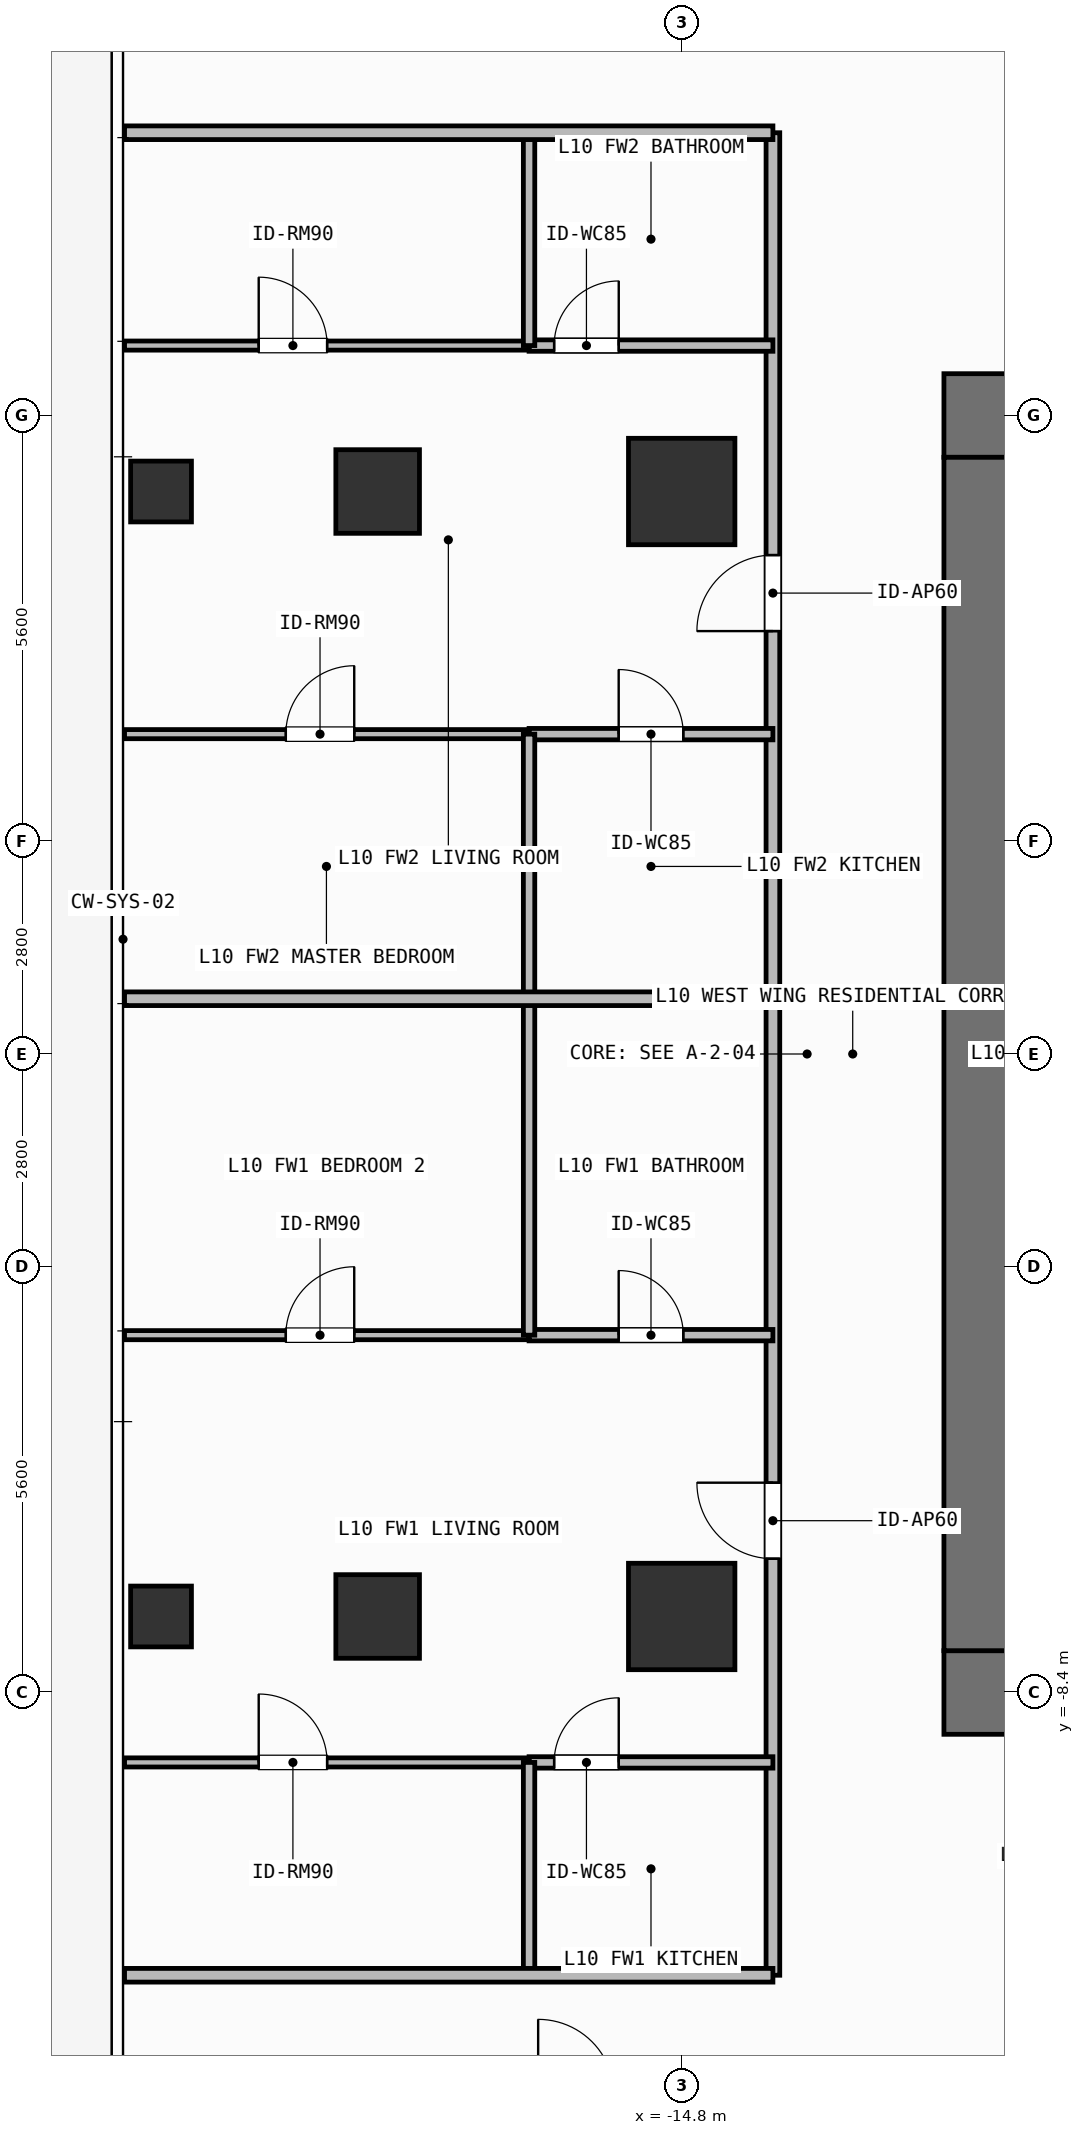
"""IFC4 building model, lengths in metres.
Left out: names, types, materials, properties, quantities, classifications, styles, units other than length and angle.
Written with IfcOpenShell. Run it as: python <this file> out.ifc"""

import sys

from ifc_helpers import new_model, si_unit, direction, frame, frame_2d, origin, origin_2d, place, context, subcontext, project, spatial, rectangle, hollow_rectangle, extrude, element, fill, save


model = new_model("IFC4")
c1 = context("Model", 3, precision=1e-05, world=origin(), true_north=direction((0.0, 1.0)))
c2 = subcontext(c1, "Body", "Model", "MODEL_VIEW")
j1 = project(units=[si_unit("LENGTHUNIT", "METRE"), si_unit("PLANEANGLEUNIT", "RADIAN")], contexts=[c1])
p1 = place(None, origin())
s1 = spatial("IfcSite", under=j1, at=p1, CompositionType="ELEMENT")
p2 = place(p1, origin())
s2 = spatial("IfcBuilding", under=s1, at=p2, CompositionType="ELEMENT")
p3 = place(p2, frame((0.0, 0.0, 38.4)))
s3 = spatial("IfcBuildingStorey", under=s2, at=p3, CompositionType="ELEMENT", Elevation=38.4)
for number, where, z_axis, x_axis in (
    (1, (-11.35, -8.4, 0.0), (0.0, 0.0, 1.0), (1.0, 0.0, 0.0)),
    (2, (-11.35, 8.4, 0.0), (0.0, 0.0, 1.0), (1.0, 0.0, 0.0)),
):
    element("IfcWall", number, at=place(p3, frame(where, z_axis=z_axis, x_axis=x_axis)), inside=s3, PredefinedType="SHEAR", context=c2, shape_type="SweptSolid", body=[
        extrude(rectangle(XDim=1.65, YDim=1.1, at=frame_2d((0.825, 0.0))), origin(), (0.0, 0.0, 1.0), 3.9),
    ])
p4 = place(p3, frame((-10.8, -7.85, 0.0), z_axis=(0.0, 0.0, 1.0), x_axis=(0.0, 1.0, 0.0)))
e3 = element("IfcWall", 3, at=p4, inside=s3, PredefinedType="SHEAR", context=c2, shape_type="SweptSolid", body=[
    extrude(rectangle(XDim=15.7, YDim=1.1, at=frame_2d((7.85, 0.0))), origin(), (0.0, 0.0, 1.0), 3.9),
])
for number, where, z_axis, x_axis in (
    (4, (-14.8, -7.4, 0.0), (0.0, 0.0, 1.0), (1.0, 0.0, 0.0)),
    (5, (-14.8, 7.4, 0.0), (0.0, 0.0, 1.0), (1.0, 0.0, 0.0)),
):
    element("IfcColumn", number, at=place(p3, frame(where, z_axis=z_axis, x_axis=x_axis)), inside=s3, PredefinedType="COLUMN", context=c2, shape_type="SweptSolid", body=[
        extrude(rectangle(XDim=1.4, YDim=1.4, at=origin_2d()), origin(), (0.0, 0.0, 1.0), 3.9),
    ])
for number, where, z_axis, x_axis in (
    (6, (-18.8, -7.4, 0.0), (0.0, 0.0, 1.0), (1.0, 0.0, 0.0)),
    (7, (-18.8, 7.4, 0.0), (0.0, 0.0, 1.0), (1.0, 0.0, 0.0)),
):
    element("IfcColumn", number, at=place(p3, frame(where, z_axis=z_axis, x_axis=x_axis)), inside=s3, PredefinedType="COLUMN", context=c2, shape_type="SweptSolid", body=[
        extrude(rectangle(XDim=1.1, YDim=1.1, at=origin_2d()), origin(), (0.0, 0.0, 1.0), 3.9),
    ])
for number, where, z_axis, x_axis in (
    (8, (-21.65, -7.4, 0.0), (0.0, 0.0, 1.0), (1.0, 0.0, 0.0)),
    (9, (-21.65, 7.4, 0.0), (0.0, 0.0, 1.0), (1.0, 0.0, 0.0)),
):
    element("IfcColumn", number, at=place(p3, frame(where, z_axis=z_axis, x_axis=x_axis)), inside=s3, PredefinedType="COLUMN", context=c2, shape_type="SweptSolid", body=[
        extrude(hollow_rectangle(XDim=0.8, YDim=0.8, WallThickness=0.036, at=origin_2d()), origin(), (0.0, 0.0, 1.0), 3.9),
    ])
p5 = place(p3, frame((-13.6, -12.12, 0.0), z_axis=(0.0, 0.0, 1.0), x_axis=(0.0, 1.0, 0.0)))
e10 = element("IfcWall", 10, at=p5, inside=s3, PredefinedType="PARTITIONING", context=c2, shape_type="SweptSolid", body=[
    extrude(rectangle(XDim=12.847, YDim=0.18, at=frame_2d((6.424, 0.0))), origin(), (0.0, 0.0, 1.0), 3.68),
])
p6 = place(p5, frame((5.48, 0.0, 0.0)))
e11 = element("IfcOpeningElement", 11, at=p6, cuts=e10, PredefinedType="OPENING", context=c2, shape_type="SweptSolid", body=[
    extrude(rectangle(XDim=1.0, YDim=2.2, at=frame_2d((0.5, 1.1))), frame((0.0, 0.1, 0.0), z_axis=(0.0, -1.0, 0.0), x_axis=(1.0, 0.0, 0.0)), (0.0, 0.0, 1.0), 0.2),
])
p7 = place(p3, frame((-16.808, -3.699, 0.0), z_axis=(0.0, 0.0, 1.0), x_axis=(1.0, 0.0, 0.0)))
e12 = element("IfcWall", 12, at=p7, inside=s3, PredefinedType="PARTITIONING", context=c2, shape_type="SweptSolid", body=[
    extrude(rectangle(XDim=3.208, YDim=0.15, at=frame_2d((1.604, 0.0))), origin(), (0.0, 0.0, 1.0), 3.68),
])
p8 = place(p7, frame((1.179, 0.0, 0.0)))
e13 = element("IfcOpeningElement", 13, at=p8, cuts=e12, PredefinedType="OPENING", context=c2, shape_type="SweptSolid", body=[
    extrude(rectangle(XDim=0.85, YDim=2.1, at=frame_2d((0.425, 1.05))), frame((0.0, 0.085, 0.0), z_axis=(0.0, -1.0, 0.0), x_axis=(1.0, 0.0, 0.0)), (0.0, 0.0, 1.0), 0.17),
])
p9 = place(p3, frame((-16.808, -9.32, 0.0), z_axis=(0.0, 0.0, 1.0), x_axis=(1.0, 0.0, 0.0)))
e14 = element("IfcWall", 14, at=p9, inside=s3, PredefinedType="PARTITIONING", context=c2, shape_type="SweptSolid", body=[
    extrude(rectangle(XDim=3.208, YDim=0.15, at=frame_2d((1.604, 0.0))), origin(), (0.0, 0.0, 1.0), 3.68),
])
p10 = place(p9, frame((0.33, 0.0, 0.0)))
e15 = element("IfcOpeningElement", 15, at=p10, cuts=e14, PredefinedType="OPENING", context=c2, shape_type="SweptSolid", body=[
    extrude(rectangle(XDim=0.85, YDim=2.1, at=frame_2d((0.425, 1.05))), frame((0.0, 0.085, 0.0), z_axis=(0.0, -1.0, 0.0), x_axis=(1.0, 0.0, 0.0)), (0.0, 0.0, 1.0), 0.17),
])
p11 = place(p3, frame((-22.13, -9.32, 0.0), z_axis=(0.0, 0.0, 1.0), x_axis=(1.0, 0.0, 0.0)))
e16 = element("IfcWall", 16, at=p11, inside=s3, PredefinedType="PARTITIONING", context=c2, shape_type="SweptSolid", body=[
    extrude(rectangle(XDim=5.322, YDim=0.12, at=frame_2d((2.661, 0.0))), origin(), (0.0, 0.0, 1.0), 3.68),
])
p12 = place(p11, frame((1.765, 0.0, 0.0)))
e17 = element("IfcOpeningElement", 17, at=p12, cuts=e16, PredefinedType="OPENING", context=c2, shape_type="SweptSolid", body=[
    extrude(rectangle(XDim=0.9, YDim=2.1, at=frame_2d((0.45, 1.05))), frame((0.0, 0.07, 0.0), z_axis=(0.0, -1.0, 0.0), x_axis=(1.0, 0.0, 0.0)), (0.0, 0.0, 1.0), 0.14),
])
p13 = place(p3, frame((-22.13, -3.699, 0.0), z_axis=(0.0, 0.0, 1.0), x_axis=(1.0, 0.0, 0.0)))
e18 = element("IfcWall", 18, at=p13, inside=s3, PredefinedType="PARTITIONING", context=c2, shape_type="SweptSolid", body=[
    extrude(rectangle(XDim=5.322, YDim=0.12, at=frame_2d((2.661, 0.0))), origin(), (0.0, 0.0, 1.0), 3.68),
])
p14 = place(p13, frame((2.122, 0.0, 0.0)))
e19 = element("IfcOpeningElement", 19, at=p14, cuts=e18, PredefinedType="OPENING", context=c2, shape_type="SweptSolid", body=[
    extrude(rectangle(XDim=0.9, YDim=2.1, at=frame_2d((0.45, 1.05))), frame((0.0, 0.07, 0.0), z_axis=(0.0, -1.0, 0.0), x_axis=(1.0, 0.0, 0.0)), (0.0, 0.0, 1.0), 0.14),
])
p15 = place(p3, frame((-13.6, 0.727, 0.0), z_axis=(0.0, 0.0, 1.0), x_axis=(0.0, 1.0, 0.0)))
e20 = element("IfcWall", 20, at=p15, inside=s3, PredefinedType="PARTITIONING", context=c2, shape_type="SweptSolid", body=[
    extrude(rectangle(XDim=11.393, YDim=0.18, at=frame_2d((5.697, 0.0))), origin(), (0.0, 0.0, 1.0), 3.68),
])
p16 = place(p15, frame((4.837, 0.0, 0.0)))
e21 = element("IfcOpeningElement", 21, at=p16, cuts=e20, PredefinedType="OPENING", context=c2, shape_type="SweptSolid", body=[
    extrude(rectangle(XDim=1.0, YDim=2.2, at=frame_2d((0.5, 1.1))), frame((0.0, 0.1, 0.0), z_axis=(0.0, -1.0, 0.0), x_axis=(1.0, 0.0, 0.0)), (0.0, 0.0, 1.0), 0.2),
])
p17 = place(p3, frame((-16.808, 9.32, 0.0), z_axis=(0.0, 0.0, 1.0), x_axis=(1.0, 0.0, 0.0)))
e22 = element("IfcWall", 22, at=p17, inside=s3, PredefinedType="PARTITIONING", context=c2, shape_type="SweptSolid", body=[
    extrude(rectangle(XDim=3.208, YDim=0.15, at=frame_2d((1.604, 0.0))), origin(), (0.0, 0.0, 1.0), 3.68),
])
p18 = place(p17, frame((0.33, 0.0, 0.0)))
e23 = element("IfcOpeningElement", 23, at=p18, cuts=e22, PredefinedType="OPENING", context=c2, shape_type="SweptSolid", body=[
    extrude(rectangle(XDim=0.85, YDim=2.1, at=frame_2d((0.425, 1.05))), frame((0.0, 0.085, 0.0), z_axis=(0.0, -1.0, 0.0), x_axis=(1.0, 0.0, 0.0)), (0.0, 0.0, 1.0), 0.17),
])
p19 = place(p3, frame((-16.808, 4.208, 0.0), z_axis=(0.0, 0.0, 1.0), x_axis=(1.0, 0.0, 0.0)))
e24 = element("IfcWall", 24, at=p19, inside=s3, PredefinedType="PARTITIONING", context=c2, shape_type="SweptSolid", body=[
    extrude(rectangle(XDim=3.208, YDim=0.15, at=frame_2d((1.604, 0.0))), origin(), (0.0, 0.0, 1.0), 3.68),
])
p20 = place(p19, frame((1.179, 0.0, 0.0)))
e25 = element("IfcOpeningElement", 25, at=p20, cuts=e24, PredefinedType="OPENING", context=c2, shape_type="SweptSolid", body=[
    extrude(rectangle(XDim=0.85, YDim=2.1, at=frame_2d((0.425, 1.05))), frame((0.0, 0.085, 0.0), z_axis=(0.0, -1.0, 0.0), x_axis=(1.0, 0.0, 0.0)), (0.0, 0.0, 1.0), 0.17),
])
p21 = place(p3, frame((-22.13, 4.208, 0.0), z_axis=(0.0, 0.0, 1.0), x_axis=(1.0, 0.0, 0.0)))
e26 = element("IfcWall", 26, at=p21, inside=s3, PredefinedType="PARTITIONING", context=c2, shape_type="SweptSolid", body=[
    extrude(rectangle(XDim=5.322, YDim=0.12, at=frame_2d((2.661, 0.0))), origin(), (0.0, 0.0, 1.0), 3.68),
])
p22 = place(p21, frame((2.122, 0.0, 0.0)))
e27 = element("IfcOpeningElement", 27, at=p22, cuts=e26, PredefinedType="OPENING", context=c2, shape_type="SweptSolid", body=[
    extrude(rectangle(XDim=0.9, YDim=2.1, at=frame_2d((0.45, 1.05))), frame((0.0, 0.07, 0.0), z_axis=(0.0, -1.0, 0.0), x_axis=(1.0, 0.0, 0.0)), (0.0, 0.0, 1.0), 0.14),
])
p23 = place(p3, frame((-22.13, 9.32, 0.0), z_axis=(0.0, 0.0, 1.0), x_axis=(1.0, 0.0, 0.0)))
e28 = element("IfcWall", 28, at=p23, inside=s3, PredefinedType="PARTITIONING", context=c2, shape_type="SweptSolid", body=[
    extrude(rectangle(XDim=5.322, YDim=0.12, at=frame_2d((2.661, 0.0))), origin(), (0.0, 0.0, 1.0), 3.68),
])
p24 = place(p23, frame((1.765, 0.0, 0.0)))
e29 = element("IfcOpeningElement", 29, at=p24, cuts=e28, PredefinedType="OPENING", context=c2, shape_type="SweptSolid", body=[
    extrude(rectangle(XDim=0.9, YDim=2.1, at=frame_2d((0.45, 1.05))), frame((0.0, 0.07, 0.0), z_axis=(0.0, -1.0, 0.0), x_axis=(1.0, 0.0, 0.0)), (0.0, 0.0, 1.0), 0.14),
])
p25 = place(p3, frame((-16.808, -12.12, 0.0), z_axis=(0.0, 0.0, 1.0), x_axis=(0.0, 1.0, 0.0)))
e30 = element("IfcWall", 30, at=p25, inside=s3, PredefinedType="PARTITIONING", context=c2, shape_type="SweptSolid", body=[
    extrude(rectangle(XDim=2.8, YDim=0.15, at=frame_2d((1.4, 0.0))), origin(), (0.0, 0.0, 1.0), 3.68),
])
p26 = place(p3, frame((-16.808, -3.699, 0.0), z_axis=(0.0, 0.0, 1.0), x_axis=(0.0, 1.0, 0.0)))
e31 = element("IfcWall", 31, at=p26, inside=s3, PredefinedType="PARTITIONING", context=c2, shape_type="SweptSolid", body=[
    extrude(rectangle(XDim=4.426, YDim=0.15, at=frame_2d((2.213, 0.0))), origin(), (0.0, 0.0, 1.0), 3.68),
])
p27 = place(p3, frame((-16.808, 0.727, 0.0), z_axis=(0.0, 0.0, 1.0), x_axis=(0.0, 1.0, 0.0)))
e32 = element("IfcWall", 32, at=p27, inside=s3, PredefinedType="PARTITIONING", context=c2, shape_type="SweptSolid", body=[
    extrude(rectangle(XDim=3.481, YDim=0.15, at=frame_2d((1.74, 0.0))), origin(), (0.0, 0.0, 1.0), 3.68),
])
p28 = place(p3, frame((-16.808, 9.32, 0.0), z_axis=(0.0, 0.0, 1.0), x_axis=(0.0, 1.0, 0.0)))
e33 = element("IfcWall", 33, at=p28, inside=s3, PredefinedType="PARTITIONING", context=c2, shape_type="SweptSolid", body=[
    extrude(rectangle(XDim=2.8, YDim=0.15, at=frame_2d((1.4, 0.0))), origin(), (0.0, 0.0, 1.0), 3.68),
])
for number, where, z_axis, x_axis in (
    (34, (-22.13, 0.727, 0.0), (0.0, 0.0, 1.0), (1.0, 0.0, 0.0)),
    (35, (-22.13, -12.12, 0.0), (0.0, 0.0, 1.0), (1.0, 0.0, 0.0)),
    (36, (-22.13, 12.12, 0.0), (0.0, 0.0, 1.0), (1.0, 0.0, 0.0)),
):
    element("IfcWall", number, at=place(p3, frame(where, z_axis=z_axis, x_axis=x_axis)), inside=s3, PredefinedType="PARTITIONING", context=c2, shape_type="SweptSolid", body=[
        extrude(rectangle(XDim=8.53, YDim=0.18, at=frame_2d((4.265, 0.0))), origin(), (0.0, 0.0, 1.0), 3.68),
    ])
p29 = place(p6, origin())
e37 = element("IfcDoor", 37, at=p29, inside=s3, OperationType="SINGLE_SWING_RIGHT", PredefinedType="DOOR", context=c2, shape_type="SweptSolid", body=[
    extrude(rectangle(XDim=1.0, YDim=2.2, at=frame_2d((0.5, 1.1))), frame((0.0, 0.025, 0.0), z_axis=(0.0, -1.0, 0.0), x_axis=(1.0, 0.0, 0.0)), (0.0, 0.0, 1.0), 0.05),
])
fill(e11, e37)
p30 = place(p8, origin())
e38 = element("IfcDoor", 38, at=p30, inside=s3, OperationType="SINGLE_SWING_LEFT", PredefinedType="DOOR", context=c2, shape_type="SweptSolid", body=[
    extrude(rectangle(XDim=0.85, YDim=2.1, at=frame_2d((0.425, 1.05))), frame((0.0, 0.025, 0.0), z_axis=(0.0, -1.0, 0.0), x_axis=(1.0, 0.0, 0.0)), (0.0, 0.0, 1.0), 0.05),
])
fill(e13, e38)
p31 = place(p10, origin())
e39 = element("IfcDoor", 39, at=p31, inside=s3, OperationType="SINGLE_SWING_RIGHT", PredefinedType="DOOR", context=c2, shape_type="SweptSolid", body=[
    extrude(rectangle(XDim=0.85, YDim=2.1, at=frame_2d((0.425, 1.05))), frame((0.0, 0.025, 0.0), z_axis=(0.0, -1.0, 0.0), x_axis=(1.0, 0.0, 0.0)), (0.0, 0.0, 1.0), 0.05),
])
fill(e15, e39)
p32 = place(p12, origin())
e40 = element("IfcDoor", 40, at=p32, inside=s3, OperationType="SINGLE_SWING_LEFT", PredefinedType="DOOR", context=c2, shape_type="SweptSolid", body=[
    extrude(rectangle(XDim=0.9, YDim=2.1, at=frame_2d((0.45, 1.05))), frame((0.0, 0.025, 0.0), z_axis=(0.0, -1.0, 0.0), x_axis=(1.0, 0.0, 0.0)), (0.0, 0.0, 1.0), 0.05),
])
fill(e17, e40)
p33 = place(p14, origin())
e41 = element("IfcDoor", 41, at=p33, inside=s3, OperationType="SINGLE_SWING_RIGHT", PredefinedType="DOOR", context=c2, shape_type="SweptSolid", body=[
    extrude(rectangle(XDim=0.9, YDim=2.1, at=frame_2d((0.45, 1.05))), frame((0.0, 0.025, 0.0), z_axis=(0.0, -1.0, 0.0), x_axis=(1.0, 0.0, 0.0)), (0.0, 0.0, 1.0), 0.05),
])
fill(e19, e41)
p34 = place(p16, origin())
e42 = element("IfcDoor", 42, at=p34, inside=s3, OperationType="SINGLE_SWING_LEFT", PredefinedType="DOOR", context=c2, shape_type="SweptSolid", body=[
    extrude(rectangle(XDim=1.0, YDim=2.2, at=frame_2d((0.5, 1.1))), frame((0.0, 0.025, 0.0), z_axis=(0.0, -1.0, 0.0), x_axis=(1.0, 0.0, 0.0)), (0.0, 0.0, 1.0), 0.05),
])
fill(e21, e42)
p35 = place(p18, origin())
e43 = element("IfcDoor", 43, at=p35, inside=s3, OperationType="SINGLE_SWING_RIGHT", PredefinedType="DOOR", context=c2, shape_type="SweptSolid", body=[
    extrude(rectangle(XDim=0.85, YDim=2.1, at=frame_2d((0.425, 1.05))), frame((0.0, 0.025, 0.0), z_axis=(0.0, -1.0, 0.0), x_axis=(1.0, 0.0, 0.0)), (0.0, 0.0, 1.0), 0.05),
])
fill(e23, e43)
p36 = place(p20, origin())
e44 = element("IfcDoor", 44, at=p36, inside=s3, OperationType="SINGLE_SWING_LEFT", PredefinedType="DOOR", context=c2, shape_type="SweptSolid", body=[
    extrude(rectangle(XDim=0.85, YDim=2.1, at=frame_2d((0.425, 1.05))), frame((0.0, 0.025, 0.0), z_axis=(0.0, -1.0, 0.0), x_axis=(1.0, 0.0, 0.0)), (0.0, 0.0, 1.0), 0.05),
])
fill(e25, e44)
p37 = place(p22, origin())
e45 = element("IfcDoor", 45, at=p37, inside=s3, OperationType="SINGLE_SWING_RIGHT", PredefinedType="DOOR", context=c2, shape_type="SweptSolid", body=[
    extrude(rectangle(XDim=0.9, YDim=2.1, at=frame_2d((0.45, 1.05))), frame((0.0, 0.025, 0.0), z_axis=(0.0, -1.0, 0.0), x_axis=(1.0, 0.0, 0.0)), (0.0, 0.0, 1.0), 0.05),
])
fill(e27, e45)
p38 = place(p24, origin())
e46 = element("IfcDoor", 46, at=p38, inside=s3, OperationType="SINGLE_SWING_LEFT", PredefinedType="DOOR", context=c2, shape_type="SweptSolid", body=[
    extrude(rectangle(XDim=0.9, YDim=2.1, at=frame_2d((0.45, 1.05))), frame((0.0, 0.025, 0.0), z_axis=(0.0, -1.0, 0.0), x_axis=(1.0, 0.0, 0.0)), (0.0, 0.0, 1.0), 0.05),
])
fill(e29, e46)
save(model, sys.argv[1])
